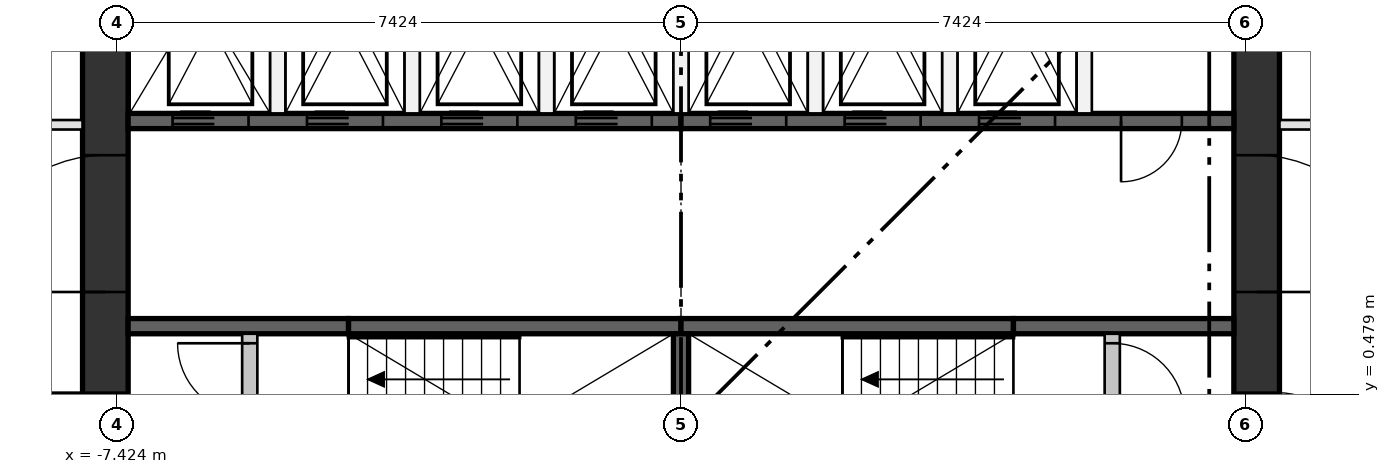
"""IFC4 building model, lengths in metres.
Left out: names, types, materials, properties, quantities, classifications, styles, units other than length and angle.
Written with IfcOpenShell. Run it as: python <this file> out.ifc"""

import sys

from ifc_helpers import new_model, si_unit, direction, frame, frame_2d, origin, place, context, subcontext, project, spatial, rectangle, extrude, element, fill, save


model = new_model("IFC4")
c1 = context("Model", 3, precision=1e-05, world=origin(), true_north=direction((0.0, 1.0)))
c2 = subcontext(c1, "Body", "Model", "MODEL_VIEW")
j1 = project(units=[si_unit("LENGTHUNIT", "METRE"), si_unit("PLANEANGLEUNIT", "RADIAN")], contexts=[c1])
p1 = place(None, origin())
s1 = spatial("IfcSite", under=j1, at=p1, CompositionType="ELEMENT")
p2 = place(p1, origin())
s2 = spatial("IfcBuilding", under=s1, at=p2, CompositionType="ELEMENT")
p3 = place(p2, frame((0.0, 0.0, 154.45)))
s3 = spatial("IfcBuildingStorey", under=s2, at=p3, CompositionType="ELEMENT", Elevation=154.45)
p4 = place(p3, frame((-7.574, -7.274, 0.0), z_axis=(0.0, 0.0, 1.0), x_axis=(0.0, 1.0, 0.0)))
e1 = element("IfcWall", 1, at=p4, inside=s3, PredefinedType="SHEAR", context=c2, shape_type="SweptSolid", body=[
    extrude(rectangle(XDim=14.548, YDim=0.6, at=frame_2d((7.274, 0.0))), origin(), (0.0, 0.0, 1.0), 3.35),
])
p5 = place(p4, frame((6.774, 0.0, 0.0)))
e2 = element("IfcOpeningElement", 2, at=p5, cuts=e1, PredefinedType="OPENING", context=c2, shape_type="SweptSolid", body=[
    extrude(rectangle(XDim=1.0, YDim=2.1, at=frame_2d((0.5, 1.05))), frame((0.0, 0.31, 0.0), z_axis=(0.0, -1.0, 0.0), x_axis=(1.0, 0.0, 0.0)), (0.0, 0.0, 1.0), 0.62),
])
p6 = place(p4, frame((3.649, 0.0, 0.0)))
e3 = element("IfcOpeningElement", 3, at=p6, cuts=e1, PredefinedType="OPENING", context=c2, shape_type="SweptSolid", body=[
    extrude(rectangle(XDim=1.8, YDim=2.1, at=frame_2d((0.9, 1.05))), frame((0.0, 0.31, 0.0), z_axis=(0.0, -1.0, 0.0), x_axis=(1.0, 0.0, 0.0)), (0.0, 0.0, 1.0), 0.62),
])
p7 = place(p4, frame((9.098, 0.0, 0.0)))
e4 = element("IfcOpeningElement", 4, at=p7, cuts=e1, PredefinedType="OPENING", context=c2, shape_type="SweptSolid", body=[
    extrude(rectangle(XDim=1.8, YDim=2.1, at=frame_2d((0.9, 1.05))), frame((0.0, 0.31, 0.0), z_axis=(0.0, -1.0, 0.0), x_axis=(1.0, 0.0, 0.0)), (0.0, 0.0, 1.0), 0.62),
])
p8 = place(p3, frame((7.574, -7.274, 0.0), z_axis=(0.0, 0.0, 1.0), x_axis=(0.0, 1.0, 0.0)))
e5 = element("IfcWall", 5, at=p8, inside=s3, PredefinedType="SHEAR", context=c2, shape_type="SweptSolid", body=[
    extrude(rectangle(XDim=14.548, YDim=0.6, at=frame_2d((7.274, 0.0))), origin(), (0.0, 0.0, 1.0), 3.35),
])
p9 = place(p8, frame((6.774, 0.0, 0.0)))
e6 = element("IfcOpeningElement", 6, at=p9, cuts=e5, PredefinedType="OPENING", context=c2, shape_type="SweptSolid", body=[
    extrude(rectangle(XDim=1.0, YDim=2.1, at=frame_2d((0.5, 1.05))), frame((0.0, 0.31, 0.0), z_axis=(0.0, -1.0, 0.0), x_axis=(1.0, 0.0, 0.0)), (0.0, 0.0, 1.0), 0.62),
])
p10 = place(p8, frame((3.649, 0.0, 0.0)))
e7 = element("IfcOpeningElement", 7, at=p10, cuts=e5, PredefinedType="OPENING", context=c2, shape_type="SweptSolid", body=[
    extrude(rectangle(XDim=1.8, YDim=2.1, at=frame_2d((0.9, 1.05))), frame((0.0, 0.31, 0.0), z_axis=(0.0, -1.0, 0.0), x_axis=(1.0, 0.0, 0.0)), (0.0, 0.0, 1.0), 0.62),
])
p11 = place(p8, frame((9.098, 0.0, 0.0)))
e8 = element("IfcOpeningElement", 8, at=p11, cuts=e5, PredefinedType="OPENING", context=c2, shape_type="SweptSolid", body=[
    extrude(rectangle(XDim=1.8, YDim=2.1, at=frame_2d((0.9, 1.05))), frame((0.0, 0.31, 0.0), z_axis=(0.0, -1.0, 0.0), x_axis=(1.0, 0.0, 0.0)), (0.0, 0.0, 1.0), 0.62),
])
p12 = place(p3, frame((-7.274, 4.074, 0.0), z_axis=(0.0, 0.0, 1.0), x_axis=(1.0, 0.0, 0.0)))
e9 = element("IfcWall", 9, at=p12, inside=s3, PredefinedType="SHEAR", context=c2, shape_type="SweptSolid", body=[
    extrude(rectangle(XDim=7.274, YDim=0.2, at=frame_2d((3.637, 0.0))), origin(), (0.0, 0.0, 1.0), 3.0),
])
p13 = place(p12, frame((0.584, 0.0, 0.0)))
e10 = element("IfcOpeningElement", 10, at=p13, cuts=e9, PredefinedType="OPENING", context=c2, shape_type="SweptSolid", body=[
    extrude(rectangle(XDim=1.0, YDim=2.1, at=frame_2d((0.5, 1.05))), frame((0.0, 0.11, 0.0), z_axis=(0.0, -1.0, 0.0), x_axis=(1.0, 0.0, 0.0)), (0.0, 0.0, 1.0), 0.22),
])
p14 = place(p12, frame((2.353, 0.0, 0.0)))
e11 = element("IfcOpeningElement", 11, at=p14, cuts=e9, PredefinedType="OPENING", context=c2, shape_type="SweptSolid", body=[
    extrude(rectangle(XDim=1.0, YDim=2.1, at=frame_2d((0.5, 1.05))), frame((0.0, 0.11, 0.0), z_axis=(0.0, -1.0, 0.0), x_axis=(1.0, 0.0, 0.0)), (0.0, 0.0, 1.0), 0.22),
])
p15 = place(p12, frame((4.121, 0.0, 0.0)))
e12 = element("IfcOpeningElement", 12, at=p15, cuts=e9, PredefinedType="OPENING", context=c2, shape_type="SweptSolid", body=[
    extrude(rectangle(XDim=1.0, YDim=2.1, at=frame_2d((0.5, 1.05))), frame((0.0, 0.11, 0.0), z_axis=(0.0, -1.0, 0.0), x_axis=(1.0, 0.0, 0.0)), (0.0, 0.0, 1.0), 0.22),
])
p16 = place(p12, frame((5.89, 0.0, 0.0)))
e13 = element("IfcOpeningElement", 13, at=p16, cuts=e9, PredefinedType="OPENING", context=c2, shape_type="SweptSolid", body=[
    extrude(rectangle(XDim=1.0, YDim=2.1, at=frame_2d((0.5, 1.05))), frame((0.0, 0.11, 0.0), z_axis=(0.0, -1.0, 0.0), x_axis=(1.0, 0.0, 0.0)), (0.0, 0.0, 1.0), 0.22),
])
p17 = place(p3, frame((0.0, 4.074, 0.0), z_axis=(0.0, 0.0, 1.0), x_axis=(1.0, 0.0, 0.0)))
e14 = element("IfcWall", 14, at=p17, inside=s3, PredefinedType="SHEAR", context=c2, shape_type="SweptSolid", body=[
    extrude(rectangle(XDim=7.274, YDim=0.2, at=frame_2d((3.637, 0.0))), origin(), (0.0, 0.0, 1.0), 3.0),
])
p18 = place(p17, frame((0.384, 0.0, 0.0)))
e15 = element("IfcOpeningElement", 15, at=p18, cuts=e14, PredefinedType="OPENING", context=c2, shape_type="SweptSolid", body=[
    extrude(rectangle(XDim=1.0, YDim=2.1, at=frame_2d((0.5, 1.05))), frame((0.0, 0.11, 0.0), z_axis=(0.0, -1.0, 0.0), x_axis=(1.0, 0.0, 0.0)), (0.0, 0.0, 1.0), 0.22),
])
p19 = place(p17, frame((2.153, 0.0, 0.0)))
e16 = element("IfcOpeningElement", 16, at=p19, cuts=e14, PredefinedType="OPENING", context=c2, shape_type="SweptSolid", body=[
    extrude(rectangle(XDim=1.0, YDim=2.1, at=frame_2d((0.5, 1.05))), frame((0.0, 0.11, 0.0), z_axis=(0.0, -1.0, 0.0), x_axis=(1.0, 0.0, 0.0)), (0.0, 0.0, 1.0), 0.22),
])
p20 = place(p17, frame((3.921, 0.0, 0.0)))
e17 = element("IfcOpeningElement", 17, at=p20, cuts=e14, PredefinedType="OPENING", context=c2, shape_type="SweptSolid", body=[
    extrude(rectangle(XDim=1.0, YDim=2.1, at=frame_2d((0.5, 1.05))), frame((0.0, 0.11, 0.0), z_axis=(0.0, -1.0, 0.0), x_axis=(1.0, 0.0, 0.0)), (0.0, 0.0, 1.0), 0.22),
])
p21 = place(p17, frame((5.79, 0.0, 0.0)))
e18 = element("IfcOpeningElement", 18, at=p21, cuts=e14, PredefinedType="OPENING", context=c2, shape_type="SweptSolid", body=[
    extrude(rectangle(XDim=0.8, YDim=2.1, at=frame_2d((0.4, 1.05))), frame((0.0, 0.11, 0.0), z_axis=(0.0, -1.0, 0.0), x_axis=(1.0, 0.0, 0.0)), (0.0, 0.0, 1.0), 0.22),
])
p22 = place(p3, frame((-7.274, 1.375, 0.0), z_axis=(0.0, 0.0, 1.0), x_axis=(1.0, 0.0, 0.0)))
e19 = element("IfcWall", 19, at=p22, inside=s3, PredefinedType="SHEAR", context=c2, shape_type="SweptSolid", body=[
    extrude(rectangle(XDim=2.9, YDim=0.2, at=frame_2d((1.45, 0.0))), origin(), (0.0, 0.0, 1.0), 3.0),
])
for number, where, z_axis, x_axis in (
    (20, (-4.374, 1.375, 0.0), (0.0, 0.0, 1.0), (1.0, 0.0, 0.0)),
    (21, (0.0, 1.375, 0.0), (0.0, 0.0, 1.0), (1.0, 0.0, 0.0)),
):
    element("IfcWall", number, at=place(p3, frame(where, z_axis=z_axis, x_axis=x_axis)), inside=s3, PredefinedType="SHEAR", context=c2, shape_type="SweptSolid", body=[
        extrude(rectangle(XDim=4.374, YDim=0.2, at=frame_2d((2.187, 0.0))), origin(), (0.0, 0.0, 1.0), 3.0),
    ])
p23 = place(p3, frame((4.374, 1.375, 0.0), z_axis=(0.0, 0.0, 1.0), x_axis=(1.0, 0.0, 0.0)))
e22 = element("IfcWall", 22, at=p23, inside=s3, PredefinedType="SHEAR", context=c2, shape_type="SweptSolid", body=[
    extrude(rectangle(XDim=2.9, YDim=0.2, at=frame_2d((1.45, 0.0))), origin(), (0.0, 0.0, 1.0), 3.0),
])
p24 = place(p3, frame((0.0, -1.275, 0.0), z_axis=(0.0, 0.0, 1.0), x_axis=(0.0, 1.0, 0.0)))
e23 = element("IfcWall", 23, at=p24, inside=s3, PredefinedType="SHEAR", context=c2, shape_type="SweptSolid", body=[
    extrude(rectangle(XDim=2.55, YDim=0.2, at=frame_2d((1.275, 0.0))), origin(), (0.0, 0.0, 1.0), 3.0),
])
for number, where, z_axis, x_axis in (
    (24, (-5.305, 4.174, 0.0), (0.0, 0.0, 1.0), (0.0, 1.0, 0.0)),
    (25, (-3.537, 4.174, 0.0), (0.0, 0.0, 1.0), (0.0, 1.0, 0.0)),
    (26, (-1.769, 4.174, 0.0), (0.0, 0.0, 1.0), (0.0, 1.0, 0.0)),
    (27, (0.0, 4.174, 0.0), (0.0, 0.0, 1.0), (0.0, 1.0, 0.0)),
    (28, (1.769, 4.174, 0.0), (0.0, 0.0, 1.0), (0.0, 1.0, 0.0)),
    (29, (3.537, 4.174, 0.0), (0.0, 0.0, 1.0), (0.0, 1.0, 0.0)),
    (30, (5.305, 4.174, 0.0), (0.0, 0.0, 1.0), (0.0, 1.0, 0.0)),
):
    element("IfcWall", number, at=place(p3, frame(where, z_axis=z_axis, x_axis=x_axis)), inside=s3, PredefinedType="PARTITIONING", context=c2, shape_type="SweptSolid", body=[
        extrude(rectangle(XDim=3.1, YDim=0.2, at=frame_2d((1.55, 0.0))), origin(), (0.0, 0.0, 1.0), 3.0),
    ])
p25 = place(p3, frame((-5.674, -1.275, 0.0), z_axis=(0.0, 0.0, 1.0), x_axis=(0.0, 1.0, 0.0)))
e31 = element("IfcWall", 31, at=p25, inside=s3, PredefinedType="PARTITIONING", context=c2, shape_type="SweptSolid", body=[
    extrude(rectangle(XDim=2.55, YDim=0.2, at=frame_2d((1.275, 0.0))), origin(), (0.0, 0.0, 1.0), 3.0),
])
p26 = place(p25, frame((0.125, 0.0, 0.0)))
e32 = element("IfcOpeningElement", 32, at=p26, cuts=e31, PredefinedType="OPENING", context=c2, shape_type="SweptSolid", body=[
    extrude(rectangle(XDim=0.95, YDim=2.1, at=frame_2d((0.475, 1.05))), frame((0.0, 0.11, 0.0), z_axis=(0.0, -1.0, 0.0), x_axis=(1.0, 0.0, 0.0)), (0.0, 0.0, 1.0), 0.22),
])
p27 = place(p25, frame((1.475, 0.0, 0.0)))
e33 = element("IfcOpeningElement", 33, at=p27, cuts=e31, PredefinedType="OPENING", context=c2, shape_type="SweptSolid", body=[
    extrude(rectangle(XDim=0.95, YDim=2.1, at=frame_2d((0.475, 1.05))), frame((0.0, 0.11, 0.0), z_axis=(0.0, -1.0, 0.0), x_axis=(1.0, 0.0, 0.0)), (0.0, 0.0, 1.0), 0.22),
])
p28 = place(p3, frame((5.674, -1.275, 0.0), z_axis=(0.0, 0.0, 1.0), x_axis=(0.0, 1.0, 0.0)))
e34 = element("IfcWall", 34, at=p28, inside=s3, PredefinedType="PARTITIONING", context=c2, shape_type="SweptSolid", body=[
    extrude(rectangle(XDim=2.55, YDim=0.2, at=frame_2d((1.275, 0.0))), origin(), (0.0, 0.0, 1.0), 3.0),
])
p29 = place(p28, frame((0.125, 0.0, 0.0)))
e35 = element("IfcOpeningElement", 35, at=p29, cuts=e34, PredefinedType="OPENING", context=c2, shape_type="SweptSolid", body=[
    extrude(rectangle(XDim=0.95, YDim=2.1, at=frame_2d((0.475, 1.05))), frame((0.0, 0.11, 0.0), z_axis=(0.0, -1.0, 0.0), x_axis=(1.0, 0.0, 0.0)), (0.0, 0.0, 1.0), 0.22),
])
p30 = place(p28, frame((1.475, 0.0, 0.0)))
e36 = element("IfcOpeningElement", 36, at=p30, cuts=e34, PredefinedType="OPENING", context=c2, shape_type="SweptSolid", body=[
    extrude(rectangle(XDim=0.95, YDim=2.1, at=frame_2d((0.475, 1.05))), frame((0.0, 0.11, 0.0), z_axis=(0.0, -1.0, 0.0), x_axis=(1.0, 0.0, 0.0)), (0.0, 0.0, 1.0), 0.22),
])
p31 = place(p3, frame((7.874, 4.024, 0.0), z_axis=(0.0, 0.0, 1.0), x_axis=(1.0, 0.0, 0.0)))
e37 = element("IfcWall", 37, at=p31, inside=s3, PredefinedType="PARTITIONING", context=c2, shape_type="SweptSolid", body=[
    extrude(rectangle(XDim=5.036, YDim=0.125, at=frame_2d((2.518, 0.0))), origin(), (0.0, 0.0, 1.0), 3.0),
])
p32 = place(p31, frame((2.0, 0.0, 0.0)))
e38 = element("IfcOpeningElement", 38, at=p32, cuts=e37, PredefinedType="OPENING", context=c2, shape_type="SweptSolid", body=[
    extrude(rectangle(XDim=1.0, YDim=2.1, at=frame_2d((0.5, 1.05))), frame((0.0, 0.073, 0.0), z_axis=(0.0, -1.0, 0.0), x_axis=(1.0, 0.0, 0.0)), (0.0, 0.0, 1.0), 0.145),
])
p33 = place(p3, frame((-11.645, 4.024, 0.0), z_axis=(0.0, 0.0, 1.0), x_axis=(1.0, 0.0, 0.0)))
e39 = element("IfcWall", 39, at=p33, inside=s3, PredefinedType="PARTITIONING", context=c2, shape_type="SweptSolid", body=[
    extrude(rectangle(XDim=3.771, YDim=0.125, at=frame_2d((1.886, 0.0))), origin(), (0.0, 0.0, 1.0), 3.0),
])
p34 = place(p33, frame((1.4, 0.0, 0.0)))
e40 = element("IfcOpeningElement", 40, at=p34, cuts=e39, PredefinedType="OPENING", context=c2, shape_type="SweptSolid", body=[
    extrude(rectangle(XDim=1.0, YDim=2.1, at=frame_2d((0.5, 1.05))), frame((0.0, 0.073, 0.0), z_axis=(0.0, -1.0, 0.0), x_axis=(1.0, 0.0, 0.0)), (0.0, 0.0, 1.0), 0.145),
])
p35 = place(p13, frame((1.0, 0.0, 0.0), z_axis=(0.0, 0.0, 1.0), x_axis=(-1.0, 0.0, 0.0)))
e41 = element("IfcDoor", 41, at=p35, inside=s3, OperationType="DOUBLE_DOOR_SLIDING", PredefinedType="DOOR", context=c2, shape_type="SweptSolid", body=[
    extrude(rectangle(XDim=1.0, YDim=2.1, at=frame_2d((0.5, 1.05))), frame((0.0, 0.025, 0.0), z_axis=(0.0, -1.0, 0.0), x_axis=(1.0, 0.0, 0.0)), (0.0, 0.0, 1.0), 0.05),
])
fill(e10, e41)
p36 = place(p14, frame((1.0, 0.0, 0.0), z_axis=(0.0, 0.0, 1.0), x_axis=(-1.0, 0.0, 0.0)))
e42 = element("IfcDoor", 42, at=p36, inside=s3, OperationType="DOUBLE_DOOR_SLIDING", PredefinedType="DOOR", context=c2, shape_type="SweptSolid", body=[
    extrude(rectangle(XDim=1.0, YDim=2.1, at=frame_2d((0.5, 1.05))), frame((0.0, 0.025, 0.0), z_axis=(0.0, -1.0, 0.0), x_axis=(1.0, 0.0, 0.0)), (0.0, 0.0, 1.0), 0.05),
])
fill(e11, e42)
p37 = place(p15, frame((1.0, 0.0, 0.0), z_axis=(0.0, 0.0, 1.0), x_axis=(-1.0, 0.0, 0.0)))
e43 = element("IfcDoor", 43, at=p37, inside=s3, OperationType="DOUBLE_DOOR_SLIDING", PredefinedType="DOOR", context=c2, shape_type="SweptSolid", body=[
    extrude(rectangle(XDim=1.0, YDim=2.1, at=frame_2d((0.5, 1.05))), frame((0.0, 0.025, 0.0), z_axis=(0.0, -1.0, 0.0), x_axis=(1.0, 0.0, 0.0)), (0.0, 0.0, 1.0), 0.05),
])
fill(e12, e43)
p38 = place(p16, frame((1.0, 0.0, 0.0), z_axis=(0.0, 0.0, 1.0), x_axis=(-1.0, 0.0, 0.0)))
e44 = element("IfcDoor", 44, at=p38, inside=s3, OperationType="DOUBLE_DOOR_SLIDING", PredefinedType="DOOR", context=c2, shape_type="SweptSolid", body=[
    extrude(rectangle(XDim=1.0, YDim=2.1, at=frame_2d((0.5, 1.05))), frame((0.0, 0.025, 0.0), z_axis=(0.0, -1.0, 0.0), x_axis=(1.0, 0.0, 0.0)), (0.0, 0.0, 1.0), 0.05),
])
fill(e13, e44)
p39 = place(p18, frame((1.0, 0.0, 0.0), z_axis=(0.0, 0.0, 1.0), x_axis=(-1.0, 0.0, 0.0)))
e45 = element("IfcDoor", 45, at=p39, inside=s3, OperationType="DOUBLE_DOOR_SLIDING", PredefinedType="DOOR", context=c2, shape_type="SweptSolid", body=[
    extrude(rectangle(XDim=1.0, YDim=2.1, at=frame_2d((0.5, 1.05))), frame((0.0, 0.025, 0.0), z_axis=(0.0, -1.0, 0.0), x_axis=(1.0, 0.0, 0.0)), (0.0, 0.0, 1.0), 0.05),
])
fill(e15, e45)
p40 = place(p19, frame((1.0, 0.0, 0.0), z_axis=(0.0, 0.0, 1.0), x_axis=(-1.0, 0.0, 0.0)))
e46 = element("IfcDoor", 46, at=p40, inside=s3, OperationType="DOUBLE_DOOR_SLIDING", PredefinedType="DOOR", context=c2, shape_type="SweptSolid", body=[
    extrude(rectangle(XDim=1.0, YDim=2.1, at=frame_2d((0.5, 1.05))), frame((0.0, 0.025, 0.0), z_axis=(0.0, -1.0, 0.0), x_axis=(1.0, 0.0, 0.0)), (0.0, 0.0, 1.0), 0.05),
])
fill(e16, e46)
p41 = place(p20, frame((1.0, 0.0, 0.0), z_axis=(0.0, 0.0, 1.0), x_axis=(-1.0, 0.0, 0.0)))
e47 = element("IfcDoor", 47, at=p41, inside=s3, OperationType="DOUBLE_DOOR_SLIDING", PredefinedType="DOOR", context=c2, shape_type="SweptSolid", body=[
    extrude(rectangle(XDim=1.0, YDim=2.1, at=frame_2d((0.5, 1.05))), frame((0.0, 0.025, 0.0), z_axis=(0.0, -1.0, 0.0), x_axis=(1.0, 0.0, 0.0)), (0.0, 0.0, 1.0), 0.05),
])
fill(e17, e47)
p42 = place(p27, origin())
e48 = element("IfcDoor", 48, at=p42, inside=s3, OperationType="SINGLE_SWING_RIGHT", PredefinedType="DOOR", context=c2, shape_type="SweptSolid", body=[
    extrude(rectangle(XDim=0.95, YDim=2.1, at=frame_2d((0.475, 1.05))), frame((0.0, 0.025, 0.0), z_axis=(0.0, -1.0, 0.0), x_axis=(1.0, 0.0, 0.0)), (0.0, 0.0, 1.0), 0.05),
])
fill(e33, e48)
p43 = place(p30, frame((0.95, 0.0, 0.0), z_axis=(0.0, 0.0, 1.0), x_axis=(-1.0, 0.0, 0.0)))
e49 = element("IfcDoor", 49, at=p43, inside=s3, OperationType="SINGLE_SWING_LEFT", PredefinedType="DOOR", context=c2, shape_type="SweptSolid", body=[
    extrude(rectangle(XDim=0.95, YDim=2.1, at=frame_2d((0.475, 1.05))), frame((0.0, 0.025, 0.0), z_axis=(0.0, -1.0, 0.0), x_axis=(1.0, 0.0, 0.0)), (0.0, 0.0, 1.0), 0.05),
])
fill(e36, e49)
p44 = place(p21, frame((0.8, 0.0, 0.0), z_axis=(0.0, 0.0, 1.0), x_axis=(-1.0, 0.0, 0.0)))
e50 = element("IfcDoor", 50, at=p44, inside=s3, OperationType="SINGLE_SWING_LEFT", PredefinedType="DOOR", context=c2, shape_type="SweptSolid", body=[
    extrude(rectangle(XDim=0.8, YDim=2.1, at=frame_2d((0.4, 1.05))), frame((0.0, 0.025, 0.0), z_axis=(0.0, -1.0, 0.0), x_axis=(1.0, 0.0, 0.0)), (0.0, 0.0, 1.0), 0.05),
])
fill(e18, e50)
p45 = place(p5, origin())
e51 = element("IfcDoor", 51, at=p45, inside=s3, OperationType="SINGLE_SWING_RIGHT", PredefinedType="DOOR", context=c2, shape_type="SweptSolid", body=[
    extrude(rectangle(XDim=1.0, YDim=2.1, at=frame_2d((0.5, 1.05))), frame((0.0, 0.3, 0.0), z_axis=(0.0, -1.0, 0.0), x_axis=(1.0, 0.0, 0.0)), (0.0, 0.0, 1.0), 0.05),
])
fill(e2, e51)
p46 = place(p7, origin())
e52 = element("IfcDoor", 52, at=p46, inside=s3, OperationType="DOUBLE_DOOR_SINGLE_SWING", PredefinedType="DOOR", context=c2, shape_type="SweptSolid", body=[
    extrude(rectangle(XDim=1.8, YDim=2.1, at=frame_2d((0.9, 1.05))), frame((0.0, 0.025, 0.0), z_axis=(0.0, -1.0, 0.0), x_axis=(1.0, 0.0, 0.0)), (0.0, 0.0, 1.0), 0.05),
])
fill(e4, e52)
p47 = place(p9, frame((1.0, 0.0, 0.0), z_axis=(0.0, 0.0, 1.0), x_axis=(-1.0, 0.0, 0.0)))
e53 = element("IfcDoor", 53, at=p47, inside=s3, OperationType="SINGLE_SWING_LEFT", PredefinedType="DOOR", context=c2, shape_type="SweptSolid", body=[
    extrude(rectangle(XDim=1.0, YDim=2.1, at=frame_2d((0.5, 1.05))), frame((0.0, 0.3, 0.0), z_axis=(0.0, -1.0, 0.0), x_axis=(1.0, 0.0, 0.0)), (0.0, 0.0, 1.0), 0.05),
])
fill(e6, e53)
p48 = place(p11, frame((1.8, 0.0, 0.0), z_axis=(0.0, 0.0, 1.0), x_axis=(-1.0, 0.0, 0.0)))
e54 = element("IfcDoor", 54, at=p48, inside=s3, OperationType="DOUBLE_DOOR_SINGLE_SWING", PredefinedType="DOOR", context=c2, shape_type="SweptSolid", body=[
    extrude(rectangle(XDim=1.8, YDim=2.1, at=frame_2d((0.9, 1.05))), frame((0.0, 0.025, 0.0), z_axis=(0.0, -1.0, 0.0), x_axis=(1.0, 0.0, 0.0)), (0.0, 0.0, 1.0), 0.05),
])
fill(e8, e54)
save(model, sys.argv[1])
